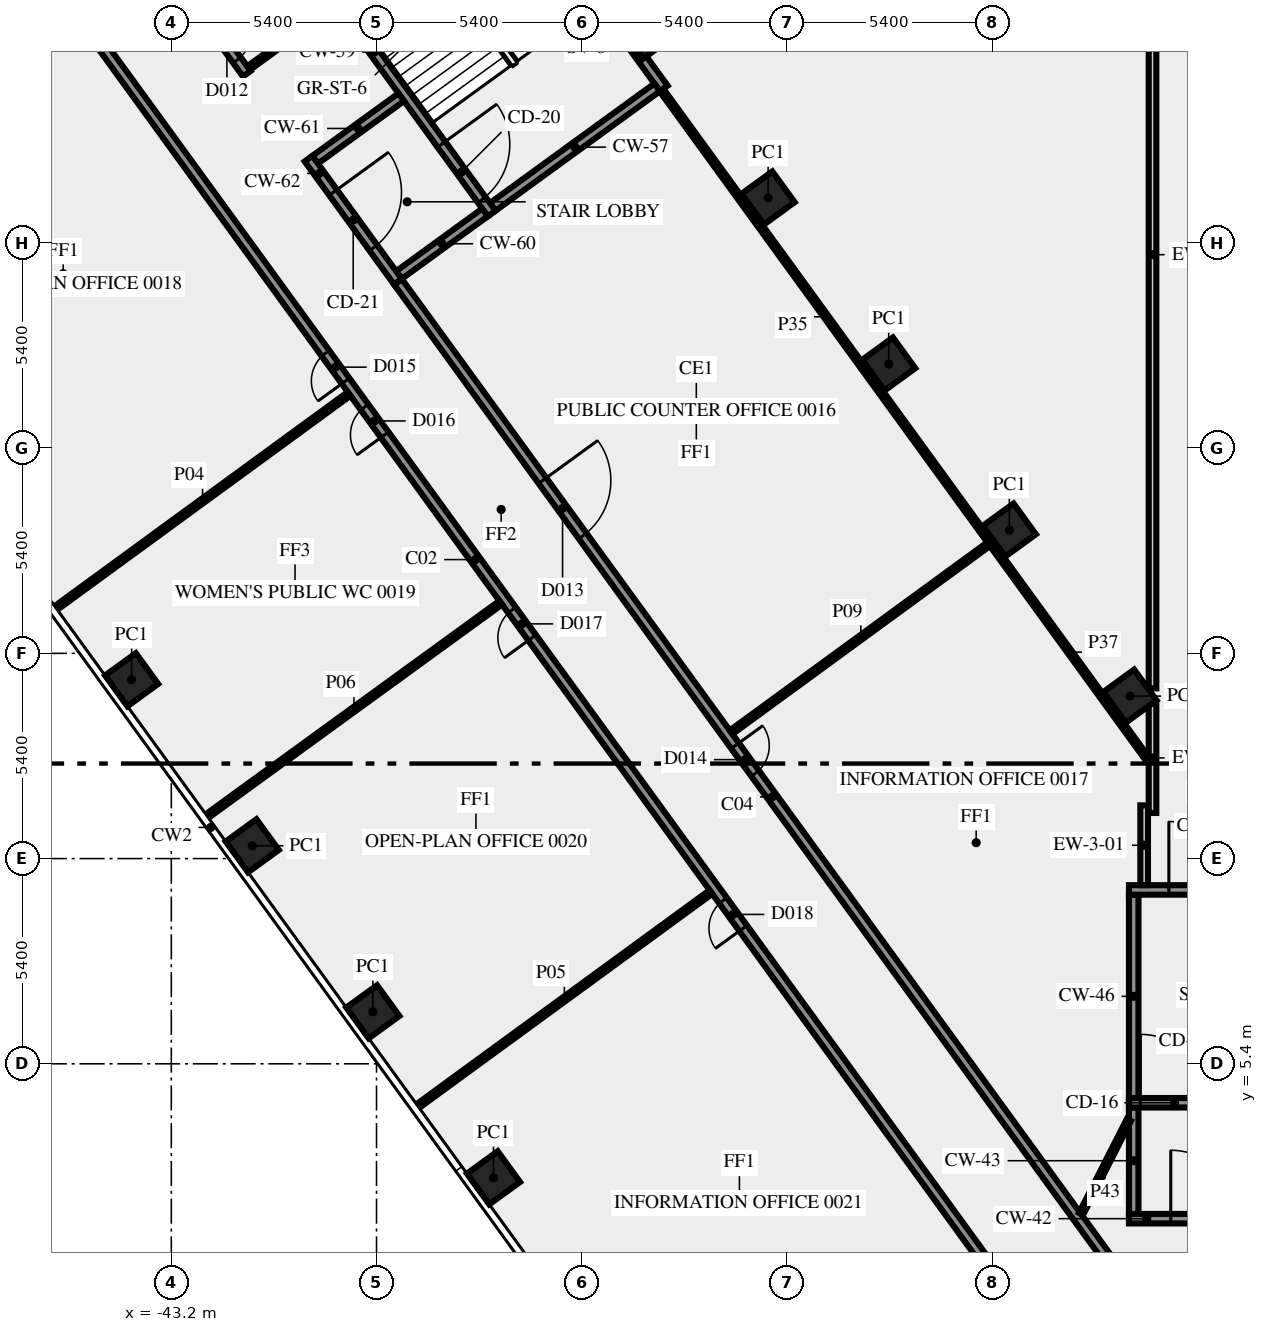
"""IFC4 building model, lengths in metres.
Left out: names, types, materials, properties, quantities, classifications, styles, units other than length and angle.
Written with IfcOpenShell. Run it as: python <this file> out.ifc"""

import sys

from ifc_helpers import new_model, si_unit, direction, frame, frame_2d, origin, origin_2d, place, context, subcontext, project, spatial, rectangle, extrude, element, fill, save


model = new_model("IFC4")
c1 = context("Model", 3, precision=1e-05, world=origin(), true_north=direction((0.0, 1.0)))
c2 = subcontext(c1, "Body", "Model", "MODEL_VIEW")
j1 = project(units=[si_unit("LENGTHUNIT", "METRE"), si_unit("PLANEANGLEUNIT", "RADIAN")], contexts=[c1])
p1 = place(None, origin())
s1 = spatial("IfcSite", under=j1, at=p1, CompositionType="ELEMENT")
p2 = place(p1, origin())
s2 = spatial("IfcBuilding", under=s1, at=p2, CompositionType="ELEMENT")
p3 = place(p2, origin())
s3 = spatial("IfcBuildingStorey", under=s2, at=p3, CompositionType="ELEMENT", Elevation=0.0)
for number, where, z_axis, x_axis in (
    (1, (-17.974, 15.075, 0.0), (0.0, 0.0, 1.0), (-0.588, 0.809, 0.0)),
    (2, (-21.147, 19.444, 0.0), (0.0, 0.0, 1.0), (-0.588, 0.809, 0.0)),
    (3, (-24.321, 23.812, 0.0), (0.0, 0.0, 1.0), (-0.588, 0.809, 0.0)),
    (4, (-27.495, 28.181, 0.0), (0.0, 0.0, 1.0), (-0.588, 0.809, 0.0)),
    (5, (-30.669, 32.55, 0.0), (0.0, 0.0, 1.0), (-0.588, 0.809, 0.0)),
    (6, (-44.244, 15.506, 0.0), (0.0, 0.0, 1.0), (0.588, -0.809, 0.0)),
    (7, (-41.07, 11.137, 0.0), (0.0, 0.0, 1.0), (0.588, -0.809, 0.0)),
    (8, (-37.896, 6.769, 0.0), (0.0, 0.0, 1.0), (0.588, -0.809, 0.0)),
    (9, (-34.722, 2.4, 0.0), (0.0, 0.0, 1.0), (0.588, -0.809, 0.0)),
):
    element("IfcColumn", number, at=place(p3, frame(where, z_axis=z_axis, x_axis=x_axis)), inside=s3, PredefinedType="COLUMN", context=c2, shape_type="SweptSolid", body=[
        extrude(rectangle(XDim=1.0, YDim=1.0, at=origin_2d()), origin(), (0.0, 0.0, 1.0), 5.6),
    ])
p4 = place(p3, frame((-18.0, 1.325, 0.0), z_axis=(0.0, 0.0, 1.0), x_axis=(1.0, 0.0, 0.0)))
e10 = element("IfcWall", 10, at=p4, inside=s3, PredefinedType="SHEAR", context=c2, shape_type="SweptSolid", body=[
    extrude(rectangle(XDim=3.9, YDim=0.25, at=frame_2d((1.95, 0.0))), origin(), (0.0, 0.0, 1.0), 5.6),
])
p5 = place(p4, frame((1.1, 0.0, 0.0)))
e11 = element("IfcOpeningElement", 11, at=p5, cuts=e10, PredefinedType="OPENING", context=c2, shape_type="SweptSolid", body=[
    extrude(rectangle(XDim=1.8, YDim=2.1, at=frame_2d((0.9, 1.05))), frame((0.0, 0.135, 0.0), z_axis=(0.0, -1.0, 0.0), x_axis=(1.0, 0.0, 0.0)), (0.0, 0.0, 1.0), 0.27),
])
p6 = place(p3, frame((-17.875, 1.45, 0.0), z_axis=(0.0, 0.0, 1.0), x_axis=(0.0, 1.0, 0.0)))
e12 = element("IfcWall", 12, at=p6, inside=s3, PredefinedType="SHEAR", context=c2, shape_type="SweptSolid", body=[
    extrude(rectangle(XDim=2.8, YDim=0.25, at=frame_2d((1.4, 0.0))), origin(), (0.0, 0.0, 1.0), 5.6),
])
p7 = place(p3, frame((-18.0, 4.375, 0.0), z_axis=(0.0, 0.0, 1.0), x_axis=(1.0, 0.0, 0.0)))
e13 = element("IfcWall", 13, at=p7, inside=s3, PredefinedType="SHEAR", context=c2, shape_type="SweptSolid", body=[
    extrude(rectangle(XDim=10.5, YDim=0.25, at=frame_2d((5.25, 0.0))), origin(), (0.0, 0.0, 1.0), 5.6),
])
p8 = place(p7, frame((0.3, 0.0, 0.0)))
e14 = element("IfcOpeningElement", 14, at=p8, cuts=e13, PredefinedType="OPENING", context=c2, shape_type="SweptSolid", body=[
    extrude(rectangle(XDim=1.8, YDim=2.1, at=frame_2d((0.9, 1.05))), frame((0.0, 0.135, 0.0), z_axis=(0.0, -1.0, 0.0), x_axis=(1.0, 0.0, 0.0)), (0.0, 0.0, 1.0), 0.27),
])
p9 = place(p3, frame((-17.875, 4.5, 0.0), z_axis=(0.0, 0.0, 1.0), x_axis=(0.0, 1.0, 0.0)))
e15 = element("IfcWall", 15, at=p9, inside=s3, PredefinedType="SHEAR", context=c2, shape_type="SweptSolid", body=[
    extrude(rectangle(XDim=5.35, YDim=0.25, at=frame_2d((2.675, 0.0))), origin(), (0.0, 0.0, 1.0), 5.6),
])
p10 = place(p3, frame((-18.0, 9.975, 0.0), z_axis=(0.0, 0.0, 1.0), x_axis=(1.0, 0.0, 0.0)))
e16 = element("IfcWall", 16, at=p10, inside=s3, PredefinedType="SHEAR", context=c2, shape_type="SweptSolid", body=[
    extrude(rectangle(XDim=10.5, YDim=0.25, at=frame_2d((5.25, 0.0))), origin(), (0.0, 0.0, 1.0), 5.6),
])
p11 = place(p10, frame((1.05, 0.0, 0.0)))
e17 = element("IfcOpeningElement", 17, at=p11, cuts=e16, PredefinedType="OPENING", context=c2, shape_type="SweptSolid", body=[
    extrude(rectangle(XDim=1.8, YDim=2.1, at=frame_2d((0.9, 1.05))), frame((0.0, 0.135, 0.0), z_axis=(0.0, -1.0, 0.0), x_axis=(1.0, 0.0, 0.0)), (0.0, 0.0, 1.0), 0.27),
])
p12 = place(p10, frame((4.5, 0.0, 1.0)))
e18 = element("IfcOpeningElement", 18, at=p12, cuts=e16, PredefinedType="OPENING", context=c2, shape_type="SweptSolid", body=[
    extrude(rectangle(XDim=1.2, YDim=1.2, at=frame_2d((0.6, 0.6))), frame((0.0, 0.135, 0.0), z_axis=(0.0, -1.0, 0.0), x_axis=(1.0, 0.0, 0.0)), (0.0, 0.0, 1.0), 0.27),
])
p13 = place(p3, frame((-30.24, 31.064, 0.0), z_axis=(0.0, 0.0, 1.0), x_axis=(-0.587795589702, 0.809009483706, 0.0)))
e19 = element("IfcWall", 19, at=p13, inside=s3, PredefinedType="SHEAR", context=c2, shape_type="SweptSolid", body=[
    extrude(rectangle(XDim=10.5, YDim=0.25, at=frame_2d((5.25, 0.0))), origin(), (0.0, 0.0, 1.0), 5.6),
])
p14 = place(p13, frame((2.15, 0.0, 1.0)))
e20 = element("IfcOpeningElement", 20, at=p14, cuts=e19, PredefinedType="OPENING", context=c2, shape_type="SweptSolid", body=[
    extrude(rectangle(XDim=1.2, YDim=1.2, at=frame_2d((0.6, 0.6))), frame((0.0, 0.135, 0.0), z_axis=(0.0, -1.0, 0.0), x_axis=(1.0, 0.0, 0.0)), (0.0, 0.0, 1.0), 0.27),
])
p15 = place(p3, frame((-30.414, 31.092, 0.0), z_axis=(0.0, 0.0, 1.0), x_axis=(-0.8089984606, -0.587810760999, 0.0)))
e21 = element("IfcWall", 21, at=p15, inside=s3, PredefinedType="SHEAR", context=c2, shape_type="SweptSolid", body=[
    extrude(rectangle(XDim=5.35, YDim=0.25, at=frame_2d((2.675, 0.0))), origin(), (0.0, 0.0, 1.0), 5.6),
])
p16 = place(p3, frame((-40.942, 36.267, 0.0), z_axis=(0.0, 0.0, 1.0), x_axis=(0.587795589702, -0.809009483706, 0.0)))
e22 = element("IfcWall", 22, at=p16, inside=s3, PredefinedType="SHEAR", context=c2, shape_type="SweptSolid", body=[
    extrude(rectangle(XDim=10.5, YDim=0.25, at=frame_2d((5.25, 0.0))), origin(), (0.0, 0.0, 1.0), 5.6),
])
p17 = place(p16, frame((8.25, 0.0, 0.0)))
e23 = element("IfcOpeningElement", 23, at=p17, cuts=e22, PredefinedType="OPENING", context=c2, shape_type="SweptSolid", body=[
    extrude(rectangle(XDim=1.8, YDim=2.1, at=frame_2d((0.9, 1.05))), frame((0.0, 0.135, 0.0), z_axis=(0.0, -1.0, 0.0), x_axis=(1.0, 0.0, 0.0)), (0.0, 0.0, 1.0), 0.27),
])
for number, where, z_axis, x_axis in (
    (24, (-34.945, 27.8, 0.0), (0.0, 0.0, 1.0), (-0.809, -0.588, 0.0)),
    (25, (-37.149, 30.834, 0.0), (0.0, 0.0, 1.0), (-0.809, -0.588, 0.0)),
):
    element("IfcWall", number, at=place(p3, frame(where, z_axis=z_axis, x_axis=x_axis)), inside=s3, PredefinedType="SHEAR", context=c2, shape_type="SweptSolid", body=[
        extrude(rectangle(XDim=2.8, YDim=0.25, at=frame_2d((1.4, 0.0))), origin(), (0.0, 0.0, 1.0), 5.6),
    ])
p18 = place(p3, frame((-39.589, 29.216, 0.0), z_axis=(0.0, 0.0, 1.0), x_axis=(0.587772420479, -0.809026317077, 0.0)))
e26 = element("IfcWall", 26, at=p18, inside=s3, PredefinedType="SHEAR", context=c2, shape_type="SweptSolid", body=[
    extrude(rectangle(XDim=4.0, YDim=0.25, at=frame_2d((2.0, 0.0))), origin(), (0.0, 0.0, 1.0), 5.6),
])
p19 = place(p18, frame((1.1, 0.0, 0.0)))
e27 = element("IfcOpeningElement", 27, at=p19, cuts=e26, PredefinedType="OPENING", context=c2, shape_type="SweptSolid", body=[
    extrude(rectangle(XDim=1.8, YDim=2.1, at=frame_2d((0.9, 1.05))), frame((0.0, 0.135, 0.0), z_axis=(0.0, -1.0, 0.0), x_axis=(1.0, 0.0, 0.0)), (0.0, 0.0, 1.0), 0.27),
])
p20 = place(p3, frame((-17.6, 10.1, 0.0), z_axis=(0.0, 0.0, 1.0), x_axis=(0.0, 1.0, 0.0)))
e28 = element("IfcWall", 28, at=p20, inside=s3, PredefinedType="SOLIDWALL", context=c2, shape_type="SweptSolid", body=[
    extrude(rectangle(XDim=2.1, YDim=0.2, at=frame_2d((1.05, 0.0))), origin(), (0.0, 0.0, 1.0), 5.6),
])
p21 = place(p3, frame((-17.38, 12.0, 0.0), z_axis=(0.0, 0.0, 1.0), x_axis=(0.0, 1.0, 0.0)))
e29 = element("IfcWall", 29, at=p21, inside=s3, PredefinedType="SOLIDWALL", context=c2, shape_type="SweptSolid", body=[
    extrude(rectangle(XDim=2.896, YDim=0.2, at=frame_2d((1.448, 0.0))), origin(), (0.0, 0.0, 1.0), 4.6),
])
p22 = place(p3, frame((-17.38, 15.28, 0.0), z_axis=(0.0, 0.0, 1.0), x_axis=(0.0, 1.0, 0.0)))
e30 = element("IfcWall", 30, at=p22, inside=s3, PredefinedType="SOLIDWALL", context=c2, shape_type="SweptSolid", body=[
    extrude(rectangle(XDim=22.82, YDim=0.2, at=frame_2d((11.41, 0.0))), origin(), (0.0, 0.0, 1.0), 4.6),
])
p23 = place(p3, frame((-20.531, -1.523, 0.0), z_axis=(0.0, 0.0, 1.0), x_axis=(-0.587784522481, 0.809017524614, 0.0)))
e31 = element("IfcWall", 31, at=p23, inside=s3, PredefinedType="SOLIDWALL", context=c2, shape_type="SweptSolid", body=[
    extrude(rectangle(XDim=49.912, YDim=0.25, at=frame_2d((24.956, 0.0))), origin(), (0.0, 0.0, 1.0), 5.6),
])
p24 = place(p23, frame((30.765, 0.0, 0.0)))
e32 = element("IfcOpeningElement", 32, at=p24, cuts=e31, PredefinedType="OPENING", context=c2, shape_type="SweptSolid", body=[
    extrude(rectangle(XDim=0.9, YDim=2.1, at=frame_2d((0.45, 1.05))), frame((0.0, 0.135, 0.0), z_axis=(0.0, -1.0, 0.0), x_axis=(1.0, 0.0, 0.0)), (0.0, 0.0, 1.0), 0.27),
])
p25 = place(p23, frame((22.416, 0.0, 0.0)))
e33 = element("IfcOpeningElement", 33, at=p25, cuts=e31, PredefinedType="OPENING", context=c2, shape_type="SweptSolid", body=[
    extrude(rectangle(XDim=0.9, YDim=2.1, at=frame_2d((0.45, 1.05))), frame((0.0, 0.135, 0.0), z_axis=(0.0, -1.0, 0.0), x_axis=(1.0, 0.0, 0.0)), (0.0, 0.0, 1.0), 0.27),
])
p26 = place(p23, frame((12.966, 0.0, 0.0)))
e34 = element("IfcOpeningElement", 34, at=p26, cuts=e31, PredefinedType="OPENING", context=c2, shape_type="SweptSolid", body=[
    extrude(rectangle(XDim=0.9, YDim=2.1, at=frame_2d((0.45, 1.05))), frame((0.0, 0.135, 0.0), z_axis=(0.0, -1.0, 0.0), x_axis=(1.0, 0.0, 0.0)), (0.0, 0.0, 1.0), 0.27),
])
p27 = place(p23, frame((29.016, 0.0, 0.0)))
e35 = element("IfcOpeningElement", 35, at=p27, cuts=e31, PredefinedType="OPENING", context=c2, shape_type="SweptSolid", body=[
    extrude(rectangle(XDim=0.9, YDim=2.1, at=frame_2d((0.45, 1.05))), frame((0.0, 0.135, 0.0), z_axis=(0.0, -1.0, 0.0), x_axis=(1.0, 0.0, 0.0)), (0.0, 0.0, 1.0), 0.27),
])
p28 = place(p3, frame((-47.725, 40.414, 0.0), z_axis=(0.0, 0.0, 1.0), x_axis=(0.587773291021, -0.809025684612, 0.0)))
e36 = element("IfcWall", 36, at=p28, inside=s3, PredefinedType="SOLIDWALL", context=c2, shape_type="SweptSolid", body=[
    extrude(rectangle(XDim=11.079, YDim=0.25, at=frame_2d((5.539, 0.0))), origin(), (0.0, 0.0, 1.0), 5.6),
])
p29 = place(p28, frame((9.737, 0.0, 0.0)))
e37 = element("IfcOpeningElement", 37, at=p29, cuts=e36, PredefinedType="OPENING", context=c2, shape_type="SweptSolid", body=[
    extrude(rectangle(XDim=0.9, YDim=2.1, at=frame_2d((0.45, 1.05))), frame((0.0, 0.135, 0.0), z_axis=(0.0, -1.0, 0.0), x_axis=(1.0, 0.0, 0.0)), (0.0, 0.0, 1.0), 0.27),
])
p30 = place(p3, frame((-37.232, 25.972, 0.0), z_axis=(0.0, 0.0, 1.0), x_axis=(0.587786323093, -0.809016216391, 0.0)))
e38 = element("IfcWall", 38, at=p30, inside=s3, PredefinedType="SOLIDWALL", context=c2, shape_type="SweptSolid", body=[
    extrude(rectangle(XDim=33.493, YDim=0.25, at=frame_2d((16.747, 0.0))), origin(), (0.0, 0.0, 1.0), 5.6),
])
p31 = place(p30, frame((6.462, 0.0, 0.0)))
e39 = element("IfcOpeningElement", 39, at=p31, cuts=e38, PredefinedType="OPENING", context=c2, shape_type="SweptSolid", body=[
    extrude(rectangle(XDim=1.8, YDim=2.1, at=frame_2d((0.9, 1.05))), frame((0.0, 0.135, 0.0), z_axis=(0.0, -1.0, 0.0), x_axis=(1.0, 0.0, 0.0)), (0.0, 0.0, 1.0), 0.27),
])
p32 = place(p30, frame((15.085, 0.0, 0.0)))
e40 = element("IfcOpeningElement", 40, at=p32, cuts=e38, PredefinedType="OPENING", context=c2, shape_type="SweptSolid", body=[
    extrude(rectangle(XDim=0.9, YDim=2.1, at=frame_2d((0.45, 1.05))), frame((0.0, 0.135, 0.0), z_axis=(0.0, -1.0, 0.0), x_axis=(1.0, 0.0, 0.0)), (0.0, 0.0, 1.0), 0.27),
])
for number, where, z_axis, x_axis in (
    (41, (-46.234, 17.394, 0.0), (0.0, 0.0, 1.0), (0.808, 0.59, 0.0)),
    (42, (-36.712, 4.288, 0.0), (0.0, 0.0, 1.0), (0.808, 0.59, 0.0)),
):
    element("IfcWall", number, at=place(p3, frame(where, z_axis=z_axis, x_axis=x_axis)), inside=s3, PredefinedType="PARTITIONING", context=c2, shape_type="SweptSolid", body=[
        extrude(rectangle(XDim=9.55, YDim=0.12, at=frame_2d((4.775, 0.0))), origin(), (0.0, 0.0, 1.0), 4.6),
    ])
p33 = place(p3, frame((-34.53, 17.533, 0.0), z_axis=(0.0, 0.0, 1.0), x_axis=(-0.809048817734, -0.587741448702, 0.0)))
e43 = element("IfcWall", 43, at=p33, inside=s3, PredefinedType="PARTITIONING", context=c2, shape_type="SweptSolid", body=[
    extrude(rectangle(XDim=9.55, YDim=0.12, at=frame_2d((4.775, 0.0))), origin(), (0.0, 0.0, 1.0), 4.6),
])
p34 = place(p3, frame((-28.469, 14.124, 0.0), z_axis=(0.0, 0.0, 1.0), x_axis=(0.807603876984, 0.589725341053, 0.0)))
e44 = element("IfcWall", 44, at=p34, inside=s3, PredefinedType="PARTITIONING", context=c2, shape_type="SweptSolid", body=[
    extrude(rectangle(XDim=8.45, YDim=0.12, at=frame_2d((4.225, 0.0))), origin(), (0.0, 0.0, 1.0), 5.6),
])
p35 = place(p3, frame((-21.633, 19.091, 0.0), z_axis=(0.0, 0.0, 1.0), x_axis=(-0.587789647109, 0.809013801335, 0.0)))
e45 = element("IfcWall", 45, at=p35, inside=s3, PredefinedType="PARTITIONING", context=c2, shape_type="SweptSolid", body=[
    extrude(rectangle(XDim=14.745, YDim=0.12, at=frame_2d((7.373, 0.0))), origin(), (0.0, 0.0, 1.0), 5.6),
])
p36 = place(p3, frame((-17.48, 13.374, 0.0), z_axis=(0.0, 0.0, 1.0), x_axis=(-0.58772993032, 0.809057185251, 0.0)))
e46 = element("IfcWall", 46, at=p36, inside=s3, PredefinedType="PARTITIONING", context=c2, shape_type="SweptSolid", body=[
    extrude(rectangle(XDim=7.066, YDim=0.12, at=frame_2d((3.533, 0.0))), origin(), (0.0, 0.0, 1.0), 5.6),
])
p37 = place(p3, frame((-41.166, 31.599, 0.0), z_axis=(0.0, 0.0, 1.0), x_axis=(0.809090262332, 0.587684394381, 0.0)))
e47 = element("IfcWall", 47, at=p37, inside=s3, PredefinedType="PARTITIONING", context=c2, shape_type="SweptSolid", body=[
    extrude(rectangle(XDim=2.801, YDim=0.12, at=frame_2d((1.4, 0.0))), origin(), (0.0, 0.0, 1.0), 5.6),
])
p38 = place(p3, frame((-19.261, 1.45, 0.0), z_axis=(0.0, 0.0, 1.0), x_axis=(0.453950796792, 0.891026752736, 0.0)))
e48 = element("IfcWall", 48, at=p38, inside=s3, PredefinedType="PARTITIONING", context=c2, shape_type="SweptSolid", body=[
    extrude(rectangle(XDim=2.778, YDim=0.12, at=frame_2d((1.389, 0.0))), origin(), (0.0, 0.0, 1.0), 5.6),
])
p39 = place(p5, origin())
e49 = element("IfcDoor", 49, at=p39, inside=s3, OperationType="DOUBLE_DOOR_SINGLE_SWING", PredefinedType="DOOR", context=c2, shape_type="SweptSolid", body=[
    extrude(rectangle(XDim=1.8, YDim=2.1, at=frame_2d((0.9, 1.05))), frame((0.0, 0.025, 0.0), z_axis=(0.0, -1.0, 0.0), x_axis=(1.0, 0.0, 0.0)), (0.0, 0.0, 1.0), 0.05),
])
fill(e11, e49)
p40 = place(p8, origin())
e50 = element("IfcDoor", 50, at=p40, inside=s3, OperationType="DOUBLE_DOOR_SINGLE_SWING", PredefinedType="DOOR", context=c2, shape_type="SweptSolid", body=[
    extrude(rectangle(XDim=1.8, YDim=2.1, at=frame_2d((0.9, 1.05))), frame((0.0, 0.025, 0.0), z_axis=(0.0, -1.0, 0.0), x_axis=(1.0, 0.0, 0.0)), (0.0, 0.0, 1.0), 0.05),
])
fill(e14, e50)
p41 = place(p11, origin())
e51 = element("IfcDoor", 51, at=p41, inside=s3, OperationType="DOUBLE_DOOR_SINGLE_SWING", PredefinedType="DOOR", context=c2, shape_type="SweptSolid", body=[
    extrude(rectangle(XDim=1.8, YDim=2.1, at=frame_2d((0.9, 1.05))), frame((0.0, 0.025, 0.0), z_axis=(0.0, -1.0, 0.0), x_axis=(1.0, 0.0, 0.0)), (0.0, 0.0, 1.0), 0.05),
])
fill(e17, e51)
p42 = place(p17, origin())
e52 = element("IfcDoor", 52, at=p42, inside=s3, OperationType="DOUBLE_DOOR_SINGLE_SWING", PredefinedType="DOOR", context=c2, shape_type="SweptSolid", body=[
    extrude(rectangle(XDim=1.8, YDim=2.1, at=frame_2d((0.9, 1.05))), frame((0.0, 0.025, 0.0), z_axis=(0.0, -1.0, 0.0), x_axis=(1.0, 0.0, 0.0)), (0.0, 0.0, 1.0), 0.05),
])
fill(e23, e52)
p43 = place(p19, origin())
e53 = element("IfcDoor", 53, at=p43, inside=s3, OperationType="DOUBLE_DOOR_SINGLE_SWING", PredefinedType="DOOR", context=c2, shape_type="SweptSolid", body=[
    extrude(rectangle(XDim=1.8, YDim=2.1, at=frame_2d((0.9, 1.05))), frame((0.0, 0.025, 0.0), z_axis=(0.0, -1.0, 0.0), x_axis=(1.0, 0.0, 0.0)), (0.0, 0.0, 1.0), 0.05),
])
fill(e27, e53)
p44 = place(p29, origin())
e54 = element("IfcDoor", 54, at=p44, inside=s3, OperationType="SINGLE_SWING_RIGHT", PredefinedType="DOOR", context=c2, shape_type="SweptSolid", body=[
    extrude(rectangle(XDim=0.9, YDim=2.1, at=frame_2d((0.45, 1.05))), frame((0.0, 0.025, 0.0), z_axis=(0.0, -1.0, 0.0), x_axis=(1.0, 0.0, 0.0)), (0.0, 0.0, 1.0), 0.05),
])
fill(e37, e54)
p45 = place(p24, origin())
e55 = element("IfcDoor", 55, at=p45, inside=s3, OperationType="SINGLE_SWING_LEFT", PredefinedType="DOOR", context=c2, shape_type="SweptSolid", body=[
    extrude(rectangle(XDim=0.9, YDim=2.1, at=frame_2d((0.45, 1.05))), frame((0.0, 0.025, 0.0), z_axis=(0.0, -1.0, 0.0), x_axis=(1.0, 0.0, 0.0)), (0.0, 0.0, 1.0), 0.05),
])
fill(e32, e55)
p46 = place(p25, origin())
e56 = element("IfcDoor", 56, at=p46, inside=s3, OperationType="SINGLE_SWING_RIGHT", PredefinedType="DOOR", context=c2, shape_type="SweptSolid", body=[
    extrude(rectangle(XDim=0.9, YDim=2.1, at=frame_2d((0.45, 1.05))), frame((0.0, 0.025, 0.0), z_axis=(0.0, -1.0, 0.0), x_axis=(1.0, 0.0, 0.0)), (0.0, 0.0, 1.0), 0.05),
])
fill(e33, e56)
p47 = place(p31, origin())
e57 = element("IfcDoor", 57, at=p47, inside=s3, OperationType="DOUBLE_DOOR_SINGLE_SWING", PredefinedType="DOOR", context=c2, shape_type="SweptSolid", body=[
    extrude(rectangle(XDim=1.8, YDim=2.1, at=frame_2d((0.9, 1.05))), frame((0.0, 0.025, 0.0), z_axis=(0.0, -1.0, 0.0), x_axis=(1.0, 0.0, 0.0)), (0.0, 0.0, 1.0), 0.05),
])
fill(e39, e57)
p48 = place(p32, origin())
e58 = element("IfcDoor", 58, at=p48, inside=s3, OperationType="SINGLE_SWING_LEFT", PredefinedType="DOOR", context=c2, shape_type="SweptSolid", body=[
    extrude(rectangle(XDim=0.9, YDim=2.1, at=frame_2d((0.45, 1.05))), frame((0.0, 0.025, 0.0), z_axis=(0.0, -1.0, 0.0), x_axis=(1.0, 0.0, 0.0)), (0.0, 0.0, 1.0), 0.05),
])
fill(e40, e58)
p49 = place(p26, origin())
e59 = element("IfcDoor", 59, at=p49, inside=s3, OperationType="SINGLE_SWING_RIGHT", PredefinedType="DOOR", context=c2, shape_type="SweptSolid", body=[
    extrude(rectangle(XDim=0.9, YDim=2.1, at=frame_2d((0.45, 1.05))), frame((0.0, 0.025, 0.0), z_axis=(0.0, -1.0, 0.0), x_axis=(1.0, 0.0, 0.0)), (0.0, 0.0, 1.0), 0.05),
])
fill(e34, e59)
p50 = place(p27, origin())
e60 = element("IfcDoor", 60, at=p50, inside=s3, OperationType="SINGLE_SWING_RIGHT", PredefinedType="DOOR", context=c2, shape_type="SweptSolid", body=[
    extrude(rectangle(XDim=0.9, YDim=2.1, at=frame_2d((0.45, 1.05))), frame((0.0, 0.025, 0.0), z_axis=(0.0, -1.0, 0.0), x_axis=(1.0, 0.0, 0.0)), (0.0, 0.0, 1.0), 0.05),
])
fill(e35, e60)
save(model, sys.argv[1])
